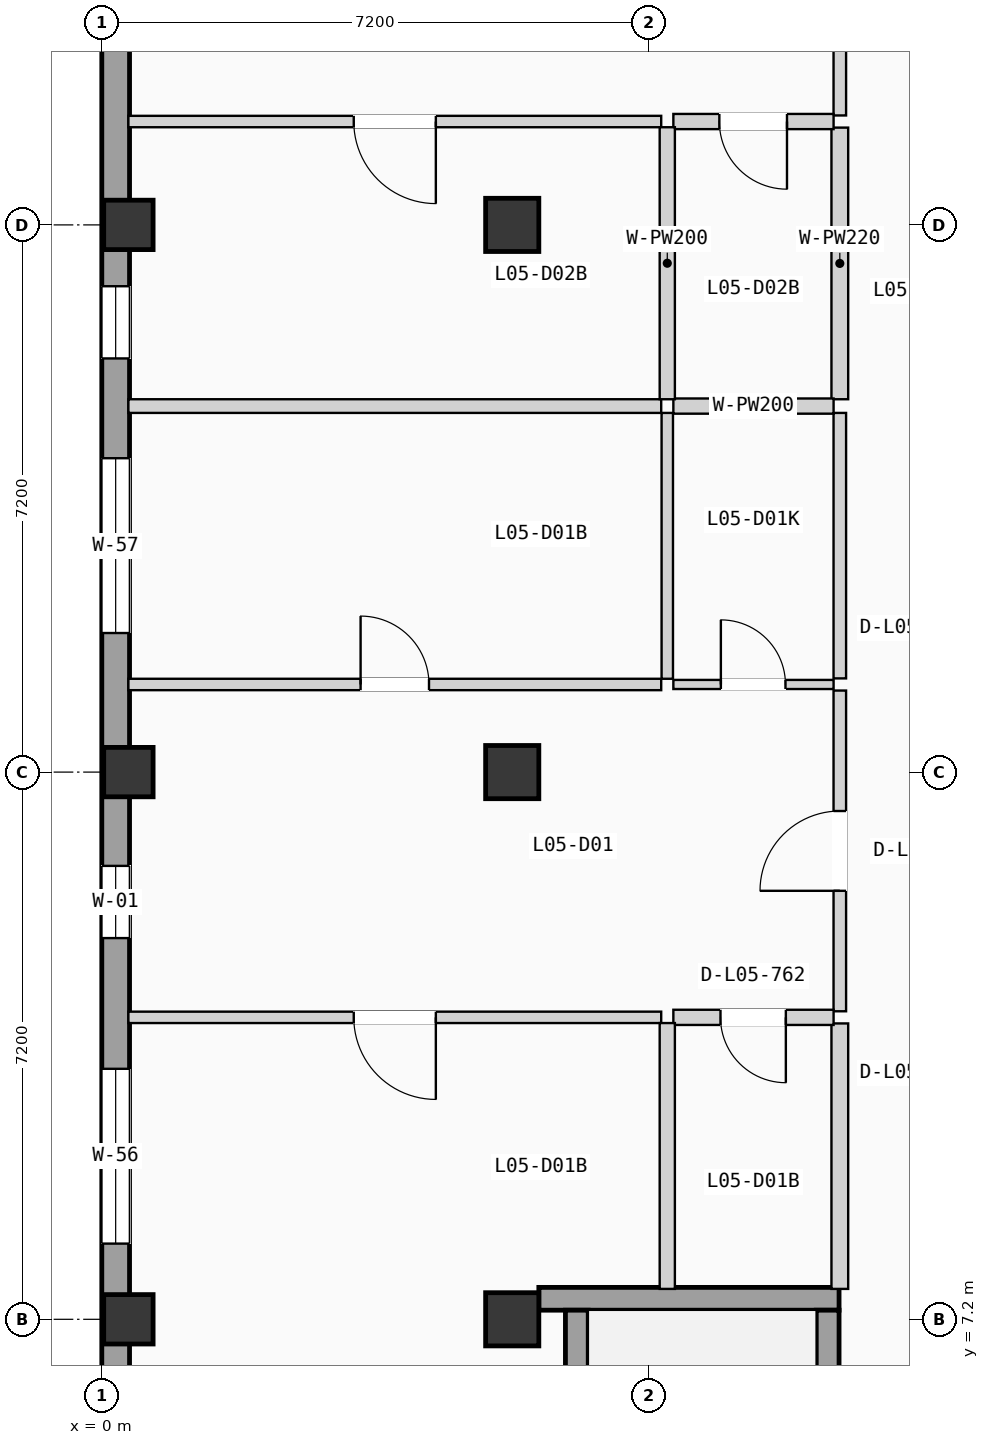
"""IFC4 building model, lengths in metres.
Left out: names, types, materials, properties, quantities, classifications, styles, units other than length and angle.
Written with IfcOpenShell. Run it as: python <this file> out.ifc"""

import sys

from ifc_helpers import new_model, si_unit, direction, frame, frame_2d, origin, origin_2d, place, context, subcontext, project, spatial, rectangle, extrude, element, fill, save


model = new_model("IFC4")
c1 = context("Model", 3, precision=1e-05, world=origin(), true_north=direction((0.0, 1.0)))
c2 = subcontext(c1, "Body", "Model", "MODEL_VIEW")
j1 = project(units=[si_unit("LENGTHUNIT", "METRE"), si_unit("PLANEANGLEUNIT", "RADIAN")], contexts=[c1])
p1 = place(None, origin())
s1 = spatial("IfcSite", under=j1, at=p1, CompositionType="ELEMENT")
p2 = place(p1, origin())
s2 = spatial("IfcBuilding", under=s1, at=p2, CompositionType="ELEMENT")
p3 = place(p2, frame((0.0, 0.0, 18.375)))
s3 = spatial("IfcBuildingStorey", under=s2, at=p3, CompositionType="ELEMENT", Elevation=18.375)
for number, where, z_axis, x_axis in (
    (1, (0.35, 7.2, 0.0), (0.0, 0.0, 1.0), (1.0, 0.0, 0.0)),
    (2, (0.35, 14.4, 0.0), (0.0, 0.0, 1.0), (1.0, 0.0, 0.0)),
    (3, (0.35, 21.6, 0.0), (0.0, 0.0, 1.0), (1.0, 0.0, 0.0)),
):
    element("IfcColumn", number, at=place(p3, frame(where, z_axis=z_axis, x_axis=x_axis)), inside=s3, PredefinedType="COLUMN", context=c2, shape_type="SweptSolid", body=[
        extrude(rectangle(XDim=0.65, YDim=0.65, at=origin_2d()), origin(), (0.0, 0.0, 1.0), 3.15),
    ])
for number, where, z_axis, x_axis in (
    (4, (5.4, 7.2, 0.0), (0.0, 0.0, 1.0), (1.0, 0.0, 0.0)),
    (5, (5.4, 14.4, 0.0), (0.0, 0.0, 1.0), (1.0, 0.0, 0.0)),
    (6, (5.4, 21.6, 0.0), (0.0, 0.0, 1.0), (1.0, 0.0, 0.0)),
):
    element("IfcColumn", number, at=place(p3, frame(where, z_axis=z_axis, x_axis=x_axis)), inside=s3, PredefinedType="COLUMN", context=c2, shape_type="SweptSolid", body=[
        extrude(rectangle(XDim=0.7, YDim=0.7, at=origin_2d()), origin(), (0.0, 0.0, 1.0), 3.15),
    ])
p4 = place(p3, frame((0.183, 0.365, 0.0), z_axis=(0.0, 0.0, 1.0), x_axis=(0.0, 1.0, 0.0)))
e7 = element("IfcWall", 7, at=p4, inside=s3, PredefinedType="SOLIDWALL", context=c2, shape_type="SweptSolid", body=[
    extrude(rectangle(XDim=49.67, YDim=0.365, at=frame_2d((24.835, 0.0))), origin(), (0.0, 0.0, 1.0), 2.89),
])
p5 = place(p4, frame((11.851, 0.0, 0.85)))
e8 = element("IfcOpeningElement", 8, at=p5, cuts=e7, PredefinedType="OPENING", context=c2, shape_type="SweptSolid", body=[
    extrude(rectangle(XDim=0.95, YDim=1.2, at=frame_2d((0.475, 0.6))), frame((0.0, 0.192, 0.0), z_axis=(0.0, -1.0, 0.0), x_axis=(1.0, 0.0, 0.0)), (0.0, 0.0, 1.0), 0.385),
])
p6 = place(p4, frame((7.831, 0.0, 0.9)))
e9 = element("IfcOpeningElement", 9, at=p6, cuts=e7, PredefinedType="OPENING", context=c2, shape_type="SweptSolid", body=[
    extrude(rectangle(XDim=2.3, YDim=1.2, at=frame_2d((1.15, 0.6))), frame((0.0, 0.192, 0.0), z_axis=(0.0, -1.0, 0.0), x_axis=(1.0, 0.0, 0.0)), (0.0, 0.0, 1.0), 0.385),
])
p7 = place(p4, frame((15.865, 0.0, 0.855)))
e10 = element("IfcOpeningElement", 10, at=p7, cuts=e7, PredefinedType="OPENING", context=c2, shape_type="SweptSolid", body=[
    extrude(rectangle(XDim=2.3, YDim=1.35, at=frame_2d((1.15, 0.675))), frame((0.0, 0.192, 0.0), z_axis=(0.0, -1.0, 0.0), x_axis=(1.0, 0.0, 0.0)), (0.0, 0.0, 1.0), 0.385),
])
p8 = place(p4, frame((23.685, 0.0, 0.705)))
e11 = element("IfcOpeningElement", 11, at=p8, cuts=e7, PredefinedType="OPENING", context=c2, shape_type="SweptSolid", body=[
    extrude(rectangle(XDim=2.3, YDim=1.5, at=frame_2d((1.15, 0.75))), frame((0.0, 0.192, 0.0), z_axis=(0.0, -1.0, 0.0), x_axis=(1.0, 0.0, 0.0)), (0.0, 0.0, 1.0), 0.385),
])
p9 = place(p4, frame((19.478, 0.0, 0.85)))
e12 = element("IfcOpeningElement", 12, at=p9, cuts=e7, PredefinedType="OPENING", context=c2, shape_type="SweptSolid", body=[
    extrude(rectangle(XDim=0.95, YDim=1.2, at=frame_2d((0.475, 0.6))), frame((0.0, 0.192, 0.0), z_axis=(0.0, -1.0, 0.0), x_axis=(1.0, 0.0, 0.0)), (0.0, 0.0, 1.0), 0.385),
])
p10 = place(p4, frame((29.242, 0.0, 0.85)))
e13 = element("IfcOpeningElement", 13, at=p10, cuts=e7, PredefinedType="OPENING", context=c2, shape_type="SweptSolid", body=[
    extrude(rectangle(XDim=0.95, YDim=1.2, at=frame_2d((0.475, 0.6))), frame((0.0, 0.192, 0.0), z_axis=(0.0, -1.0, 0.0), x_axis=(1.0, 0.0, 0.0)), (0.0, 0.0, 1.0), 0.385),
])
p11 = place(p4, frame((36.868, 0.0, 0.9)))
e14 = element("IfcOpeningElement", 14, at=p11, cuts=e7, PredefinedType="OPENING", context=c2, shape_type="SweptSolid", body=[
    extrude(rectangle(XDim=0.95, YDim=1.2, at=frame_2d((0.475, 0.6))), frame((0.0, 0.192, 0.0), z_axis=(0.0, -1.0, 0.0), x_axis=(1.0, 0.0, 0.0)), (0.0, 0.0, 1.0), 0.385),
])
p12 = place(p4, frame((32.18, 0.0, 0.855)))
e15 = element("IfcOpeningElement", 15, at=p12, cuts=e7, PredefinedType="OPENING", context=c2, shape_type="SweptSolid", body=[
    extrude(rectangle(XDim=0.95, YDim=1.35, at=frame_2d((0.475, 0.675))), frame((0.0, 0.192, 0.0), z_axis=(0.0, -1.0, 0.0), x_axis=(1.0, 0.0, 0.0)), (0.0, 0.0, 1.0), 0.385),
])
p13 = place(p4, frame((40.213, 0.0, 0.705)))
e16 = element("IfcOpeningElement", 16, at=p13, cuts=e7, PredefinedType="OPENING", context=c2, shape_type="SweptSolid", body=[
    extrude(rectangle(XDim=0.95, YDim=1.5, at=frame_2d((0.475, 0.75))), frame((0.0, 0.192, 0.0), z_axis=(0.0, -1.0, 0.0), x_axis=(1.0, 0.0, 0.0)), (0.0, 0.0, 1.0), 0.385),
])
p14 = place(p3, frame((5.75, 7.47, 0.0), z_axis=(0.0, 0.0, 1.0), x_axis=(1.0, 0.0, 0.0)))
e17 = element("IfcWall", 17, at=p14, inside=s3, PredefinedType="SHEAR", context=c2, shape_type="SweptSolid", body=[
    extrude(rectangle(XDim=3.95, YDim=0.3, at=frame_2d((1.975, 0.0))), origin(), (0.0, 0.0, 1.0), 2.89),
])
p15 = place(p3, frame((6.25, 0.32, 0.0), z_axis=(0.0, 0.0, 1.0), x_axis=(0.0, 1.0, 0.0)))
e18 = element("IfcWall", 18, at=p15, inside=s3, PredefinedType="SHEAR", context=c2, shape_type="SweptSolid", body=[
    extrude(rectangle(XDim=7.0, YDim=0.3, at=frame_2d((3.5, 0.0))), origin(), (0.0, 0.0, 1.0), 2.89),
])
p16 = place(p3, frame((9.55, 0.32, 0.0), z_axis=(0.0, 0.0, 1.0), x_axis=(0.0, 1.0, 0.0)))
e19 = element("IfcWall", 19, at=p16, inside=s3, PredefinedType="SHEAR", context=c2, shape_type="SweptSolid", body=[
    extrude(rectangle(XDim=7.0, YDim=0.3, at=frame_2d((3.5, 0.0))), origin(), (0.0, 0.0, 1.0), 2.89),
])
p17 = place(p16, frame((0.225, 0.0, 0.0)))
e20 = element("IfcOpeningElement", 20, at=p17, cuts=e19, PredefinedType="OPENING", context=c2, shape_type="SweptSolid", body=[
    extrude(rectangle(XDim=1.15, YDim=2.12, at=frame_2d((0.575, 1.06))), frame((0.0, 0.16, 0.0), z_axis=(0.0, -1.0, 0.0), x_axis=(1.0, 0.0, 0.0)), (0.0, 0.0, 1.0), 0.32),
])
p18 = place(p3, frame((9.71, 11.253, 0.0), z_axis=(0.0, 0.0, 1.0), x_axis=(0.0, 1.0, 0.0)))
e21 = element("IfcWall", 21, at=p18, inside=s3, PredefinedType="PARTITIONING", context=c2, shape_type="SweptSolid", body=[
    extrude(rectangle(XDim=4.22, YDim=0.165, at=frame_2d((2.11, 0.0))), origin(), (0.0, 0.0, 1.0), 2.87),
])
p19 = place(p18, frame((1.585, 0.0, 0.0)))
e22 = element("IfcOpeningElement", 22, at=p19, cuts=e21, PredefinedType="OPENING", context=c2, shape_type="SweptSolid", body=[
    extrude(rectangle(XDim=1.05, YDim=2.13, at=frame_2d((0.525, 1.065))), frame((0.0, 0.093, 0.0), z_axis=(0.0, -1.0, 0.0), x_axis=(1.0, 0.0, 0.0)), (0.0, 0.0, 1.0), 0.185),
])
p20 = place(p3, frame((9.71, 7.6, 0.0), z_axis=(0.0, 0.0, 1.0), x_axis=(0.0, 1.0, 0.0)))
e23 = element("IfcWall", 23, at=p20, inside=s3, PredefinedType="PLUMBINGWALL", context=c2, shape_type="SweptSolid", body=[
    extrude(rectangle(XDim=3.493, YDim=0.22, at=frame_2d((1.747, 0.0))), origin(), (0.0, 0.0, 1.0), 2.87),
])
p21 = place(p3, frame((9.71, 15.633, 0.0), z_axis=(0.0, 0.0, 1.0), x_axis=(0.0, 1.0, 0.0)))
e24 = element("IfcWall", 24, at=p21, inside=s3, PredefinedType="PARTITIONING", context=c2, shape_type="SweptSolid", body=[
    extrude(rectangle(XDim=3.493, YDim=0.165, at=frame_2d((1.747, 0.0))), origin(), (0.0, 0.0, 1.0), 2.87),
])
p22 = place(p3, frame((9.71, 23.04, 0.0), z_axis=(0.0, 0.0, 1.0), x_axis=(0.0, 1.0, 0.0)))
e25 = element("IfcWall", 25, at=p22, inside=s3, PredefinedType="PARTITIONING", context=c2, shape_type="SweptSolid", body=[
    extrude(rectangle(XDim=4.32, YDim=0.165, at=frame_2d((2.16, 0.0))), origin(), (0.0, 0.0, 1.0), 2.87),
])
p23 = place(p22, frame((1.635, 0.0, 0.0)))
e26 = element("IfcOpeningElement", 26, at=p23, cuts=e25, PredefinedType="OPENING", context=c2, shape_type="SweptSolid", body=[
    extrude(rectangle(XDim=1.05, YDim=2.13, at=frame_2d((0.525, 1.065))), frame((0.0, 0.093, 0.0), z_axis=(0.0, -1.0, 0.0), x_axis=(1.0, 0.0, 0.0)), (0.0, 0.0, 1.0), 0.185),
])
p24 = place(p3, frame((9.71, 19.306, 0.0), z_axis=(0.0, 0.0, 1.0), x_axis=(0.0, 1.0, 0.0)))
e27 = element("IfcWall", 27, at=p24, inside=s3, PredefinedType="PLUMBINGWALL", context=c2, shape_type="SweptSolid", body=[
    extrude(rectangle(XDim=3.574, YDim=0.22, at=frame_2d((1.787, 0.0))), origin(), (0.0, 0.0, 1.0), 2.87),
])
p25 = place(p3, frame((7.52, 11.173, 0.0), z_axis=(0.0, 0.0, 1.0), x_axis=(1.0, 0.0, 0.0)))
e28 = element("IfcWall", 28, at=p25, inside=s3, PredefinedType="PLUMBINGWALL", context=c2, shape_type="SweptSolid", body=[
    extrude(rectangle(XDim=2.108, YDim=0.2, at=frame_2d((1.054, 0.0))), origin(), (0.0, 0.0, 1.0), 2.87),
])
p26 = place(p25, frame((0.62, 0.0, 0.0)))
e29 = element("IfcOpeningElement", 29, at=p26, cuts=e28, PredefinedType="OPENING", context=c2, shape_type="SweptSolid", body=[
    extrude(rectangle(XDim=0.86, YDim=2.0, at=frame_2d((0.43, 1.0))), frame((0.0, 0.11, 0.0), z_axis=(0.0, -1.0, 0.0), x_axis=(1.0, 0.0, 0.0)), (0.0, 0.0, 1.0), 0.22),
])
p27 = place(p3, frame((7.52, 15.553, 0.0), z_axis=(0.0, 0.0, 1.0), x_axis=(1.0, 0.0, 0.0)))
e30 = element("IfcWall", 30, at=p27, inside=s3, PredefinedType="PARTITIONING", context=c2, shape_type="SweptSolid", body=[
    extrude(rectangle(XDim=2.108, YDim=0.12, at=frame_2d((1.054, 0.0))), origin(), (0.0, 0.0, 1.0), 2.87),
])
p28 = place(p27, frame((0.625, 0.0, 0.0)))
e31 = element("IfcOpeningElement", 31, at=p28, cuts=e30, PredefinedType="OPENING", context=c2, shape_type="SweptSolid", body=[
    extrude(rectangle(XDim=0.85, YDim=2.01, at=frame_2d((0.425, 1.005))), frame((0.0, 0.07, 0.0), z_axis=(0.0, -1.0, 0.0), x_axis=(1.0, 0.0, 0.0)), (0.0, 0.0, 1.0), 0.14),
])
p29 = place(p3, frame((0.35, 11.173, 0.0), z_axis=(0.0, 0.0, 1.0), x_axis=(1.0, 0.0, 0.0)))
e32 = element("IfcWall", 32, at=p29, inside=s3, PredefinedType="PARTITIONING", context=c2, shape_type="SweptSolid", body=[
    extrude(rectangle(XDim=7.01, YDim=0.15, at=frame_2d((3.505, 0.0))), origin(), (0.0, 0.0, 1.0), 2.87),
])
p30 = place(p29, frame((2.965, 0.0, 0.0)))
e33 = element("IfcOpeningElement", 33, at=p30, cuts=e32, PredefinedType="OPENING", context=c2, shape_type="SweptSolid", body=[
    extrude(rectangle(XDim=1.08, YDim=2.1, at=frame_2d((0.54, 1.05))), frame((0.0, 0.085, 0.0), z_axis=(0.0, -1.0, 0.0), x_axis=(1.0, 0.0, 0.0)), (0.0, 0.0, 1.0), 0.17),
])
p31 = place(p3, frame((0.35, 15.553, 0.0), z_axis=(0.0, 0.0, 1.0), x_axis=(1.0, 0.0, 0.0)))
e34 = element("IfcWall", 34, at=p31, inside=s3, PredefinedType="PARTITIONING", context=c2, shape_type="SweptSolid", body=[
    extrude(rectangle(XDim=7.01, YDim=0.15, at=frame_2d((3.505, 0.0))), origin(), (0.0, 0.0, 1.0), 2.87),
])
p32 = place(p31, frame((3.055, 0.0, 0.0)))
e35 = element("IfcOpeningElement", 35, at=p32, cuts=e34, PredefinedType="OPENING", context=c2, shape_type="SweptSolid", body=[
    extrude(rectangle(XDim=0.9, YDim=2.04, at=frame_2d((0.45, 1.02))), frame((0.0, 0.085, 0.0), z_axis=(0.0, -1.0, 0.0), x_axis=(1.0, 0.0, 0.0)), (0.0, 0.0, 1.0), 0.17),
])
p33 = place(p3, frame((7.44, 7.6, 0.0), z_axis=(0.0, 0.0, 1.0), x_axis=(0.0, 1.0, 0.0)))
e36 = element("IfcWall", 36, at=p33, inside=s3, PredefinedType="PLUMBINGWALL", context=c2, shape_type="SweptSolid", body=[
    extrude(rectangle(XDim=3.498, YDim=0.2, at=frame_2d((1.749, 0.0))), origin(), (0.0, 0.0, 1.0), 2.87),
])
p34 = place(p3, frame((7.44, 15.628, 0.0), z_axis=(0.0, 0.0, 1.0), x_axis=(0.0, 1.0, 0.0)))
e37 = element("IfcWall", 37, at=p34, inside=s3, PredefinedType="PARTITIONING", context=c2, shape_type="SweptSolid", body=[
    extrude(rectangle(XDim=3.498, YDim=0.15, at=frame_2d((1.749, 0.0))), origin(), (0.0, 0.0, 1.0), 2.87),
])
p35 = place(p3, frame((7.52, 19.216, 0.0), z_axis=(0.0, 0.0, 1.0), x_axis=(1.0, 0.0, 0.0)))
e38 = element("IfcWall", 38, at=p35, inside=s3, PredefinedType="PLUMBINGWALL", context=c2, shape_type="SweptSolid", body=[
    extrude(rectangle(XDim=2.108, YDim=0.2, at=frame_2d((1.054, 0.0))), origin(), (0.0, 0.0, 1.0), 2.87),
])
p36 = place(p3, frame((0.35, 19.216, 0.0), z_axis=(0.0, 0.0, 1.0), x_axis=(1.0, 0.0, 0.0)))
e39 = element("IfcWall", 39, at=p36, inside=s3, PredefinedType="PARTITIONING", context=c2, shape_type="SweptSolid", body=[
    extrude(rectangle(XDim=7.01, YDim=0.18, at=frame_2d((3.505, 0.0))), origin(), (0.0, 0.0, 1.0), 2.87),
])
p37 = place(p3, frame((7.52, 22.96, 0.0), z_axis=(0.0, 0.0, 1.0), x_axis=(1.0, 0.0, 0.0)))
e40 = element("IfcWall", 40, at=p37, inside=s3, PredefinedType="PLUMBINGWALL", context=c2, shape_type="SweptSolid", body=[
    extrude(rectangle(XDim=2.108, YDim=0.2, at=frame_2d((1.054, 0.0))), origin(), (0.0, 0.0, 1.0), 2.87),
])
p38 = place(p37, frame((0.605, 0.0, 0.0)))
e41 = element("IfcOpeningElement", 41, at=p38, cuts=e40, PredefinedType="OPENING", context=c2, shape_type="SweptSolid", body=[
    extrude(rectangle(XDim=0.89, YDim=2.03, at=frame_2d((0.445, 1.015))), frame((0.0, 0.11, 0.0), z_axis=(0.0, -1.0, 0.0), x_axis=(1.0, 0.0, 0.0)), (0.0, 0.0, 1.0), 0.22),
])
p39 = place(p3, frame((0.35, 22.96, 0.0), z_axis=(0.0, 0.0, 1.0), x_axis=(1.0, 0.0, 0.0)))
e42 = element("IfcWall", 42, at=p39, inside=s3, PredefinedType="PARTITIONING", context=c2, shape_type="SweptSolid", body=[
    extrude(rectangle(XDim=7.01, YDim=0.15, at=frame_2d((3.505, 0.0))), origin(), (0.0, 0.0, 1.0), 2.87),
])
p40 = place(p39, frame((2.965, 0.0, 0.0)))
e43 = element("IfcOpeningElement", 43, at=p40, cuts=e42, PredefinedType="OPENING", context=c2, shape_type="SweptSolid", body=[
    extrude(rectangle(XDim=1.08, YDim=2.1, at=frame_2d((0.54, 1.05))), frame((0.0, 0.085, 0.0), z_axis=(0.0, -1.0, 0.0), x_axis=(1.0, 0.0, 0.0)), (0.0, 0.0, 1.0), 0.17),
])
p41 = place(p3, frame((7.44, 19.306, 0.0), z_axis=(0.0, 0.0, 1.0), x_axis=(0.0, 1.0, 0.0)))
e44 = element("IfcWall", 44, at=p41, inside=s3, PredefinedType="PLUMBINGWALL", context=c2, shape_type="SweptSolid", body=[
    extrude(rectangle(XDim=3.579, YDim=0.2, at=frame_2d((1.79, 0.0))), origin(), (0.0, 0.0, 1.0), 2.87),
])
p42 = place(p5, origin())
e45 = element("IfcWindow", 45, at=p42, inside=s3, PartitioningType="SINGLE_PANEL", PredefinedType="WINDOW", context=c2, shape_type="SweptSolid", body=[
    extrude(rectangle(XDim=0.95, YDim=1.2, at=frame_2d((0.475, 0.6))), frame((0.0, 0.03, 0.0), z_axis=(0.0, -1.0, 0.0), x_axis=(1.0, 0.0, 0.0)), (0.0, 0.0, 1.0), 0.06),
])
fill(e8, e45)
p43 = place(p6, origin())
e46 = element("IfcWindow", 46, at=p43, inside=s3, PartitioningType="DOUBLE_PANEL_VERTICAL", PredefinedType="WINDOW", context=c2, shape_type="SweptSolid", body=[
    extrude(rectangle(XDim=2.3, YDim=1.2, at=frame_2d((1.15, 0.6))), frame((0.0, 0.03, 0.0), z_axis=(0.0, -1.0, 0.0), x_axis=(1.0, 0.0, 0.0)), (0.0, 0.0, 1.0), 0.06),
])
fill(e9, e46)
p44 = place(p7, origin())
e47 = element("IfcWindow", 47, at=p44, inside=s3, PartitioningType="DOUBLE_PANEL_VERTICAL", PredefinedType="WINDOW", context=c2, shape_type="SweptSolid", body=[
    extrude(rectangle(XDim=2.3, YDim=1.35, at=frame_2d((1.15, 0.675))), frame((0.0, 0.03, 0.0), z_axis=(0.0, -1.0, 0.0), x_axis=(1.0, 0.0, 0.0)), (0.0, 0.0, 1.0), 0.06),
])
fill(e10, e47)
p45 = place(p9, origin())
e48 = element("IfcWindow", 48, at=p45, inside=s3, PartitioningType="SINGLE_PANEL", PredefinedType="WINDOW", context=c2, shape_type="SweptSolid", body=[
    extrude(rectangle(XDim=0.95, YDim=1.2, at=frame_2d((0.475, 0.6))), frame((0.0, 0.03, 0.0), z_axis=(0.0, -1.0, 0.0), x_axis=(1.0, 0.0, 0.0)), (0.0, 0.0, 1.0), 0.06),
])
fill(e12, e48)
p46 = place(p19, origin())
e49 = element("IfcDoor", 49, at=p46, inside=s3, OperationType="SINGLE_SWING_LEFT", PredefinedType="DOOR", context=c2, shape_type="SweptSolid", body=[
    extrude(rectangle(XDim=1.05, YDim=2.13, at=frame_2d((0.525, 1.065))), frame((0.0, 0.025, 0.0), z_axis=(0.0, -1.0, 0.0), x_axis=(1.0, 0.0, 0.0)), (0.0, 0.0, 1.0), 0.05),
])
fill(e22, e49)
p47 = place(p26, frame((0.86, 0.0, 0.0), z_axis=(0.0, 0.0, 1.0), x_axis=(-1.0, 0.0, 0.0)))
e50 = element("IfcDoor", 50, at=p47, inside=s3, OperationType="SINGLE_SWING_RIGHT", PredefinedType="DOOR", context=c2, shape_type="SweptSolid", body=[
    extrude(rectangle(XDim=0.86, YDim=2.0, at=frame_2d((0.43, 1.0))), frame((0.0, 0.025, 0.0), z_axis=(0.0, -1.0, 0.0), x_axis=(1.0, 0.0, 0.0)), (0.0, 0.0, 1.0), 0.05),
])
fill(e29, e50)
p48 = place(p28, origin())
e51 = element("IfcDoor", 51, at=p48, inside=s3, OperationType="SINGLE_SWING_LEFT", PredefinedType="DOOR", context=c2, shape_type="SweptSolid", body=[
    extrude(rectangle(XDim=0.85, YDim=2.01, at=frame_2d((0.425, 1.005))), frame((0.0, 0.025, 0.0), z_axis=(0.0, -1.0, 0.0), x_axis=(1.0, 0.0, 0.0)), (0.0, 0.0, 1.0), 0.05),
])
fill(e31, e51)
p49 = place(p30, frame((1.08, 0.0, 0.0), z_axis=(0.0, 0.0, 1.0), x_axis=(-1.0, 0.0, 0.0)))
e52 = element("IfcDoor", 52, at=p49, inside=s3, OperationType="SINGLE_SWING_RIGHT", PredefinedType="DOOR", context=c2, shape_type="SweptSolid", body=[
    extrude(rectangle(XDim=1.08, YDim=2.1, at=frame_2d((0.54, 1.05))), frame((0.0, 0.025, 0.0), z_axis=(0.0, -1.0, 0.0), x_axis=(1.0, 0.0, 0.0)), (0.0, 0.0, 1.0), 0.05),
])
fill(e33, e52)
p50 = place(p32, origin())
e53 = element("IfcDoor", 53, at=p50, inside=s3, OperationType="SINGLE_SWING_LEFT", PredefinedType="DOOR", context=c2, shape_type="SweptSolid", body=[
    extrude(rectangle(XDim=0.9, YDim=2.04, at=frame_2d((0.45, 1.02))), frame((0.0, 0.025, 0.0), z_axis=(0.0, -1.0, 0.0), x_axis=(1.0, 0.0, 0.0)), (0.0, 0.0, 1.0), 0.05),
])
fill(e35, e53)
p51 = place(p38, frame((0.89, 0.0, 0.0), z_axis=(0.0, 0.0, 1.0), x_axis=(-1.0, 0.0, 0.0)))
e54 = element("IfcDoor", 54, at=p51, inside=s3, OperationType="SINGLE_SWING_RIGHT", PredefinedType="DOOR", context=c2, shape_type="SweptSolid", body=[
    extrude(rectangle(XDim=0.89, YDim=2.03, at=frame_2d((0.445, 1.015))), frame((0.0, 0.025, 0.0), z_axis=(0.0, -1.0, 0.0), x_axis=(1.0, 0.0, 0.0)), (0.0, 0.0, 1.0), 0.05),
])
fill(e41, e54)
p52 = place(p40, frame((1.08, 0.0, 0.0), z_axis=(0.0, 0.0, 1.0), x_axis=(-1.0, 0.0, 0.0)))
e55 = element("IfcDoor", 55, at=p52, inside=s3, OperationType="SINGLE_SWING_RIGHT", PredefinedType="DOOR", context=c2, shape_type="SweptSolid", body=[
    extrude(rectangle(XDim=1.08, YDim=2.1, at=frame_2d((0.54, 1.05))), frame((0.0, 0.025, 0.0), z_axis=(0.0, -1.0, 0.0), x_axis=(1.0, 0.0, 0.0)), (0.0, 0.0, 1.0), 0.05),
])
fill(e43, e55)
save(model, sys.argv[1])
